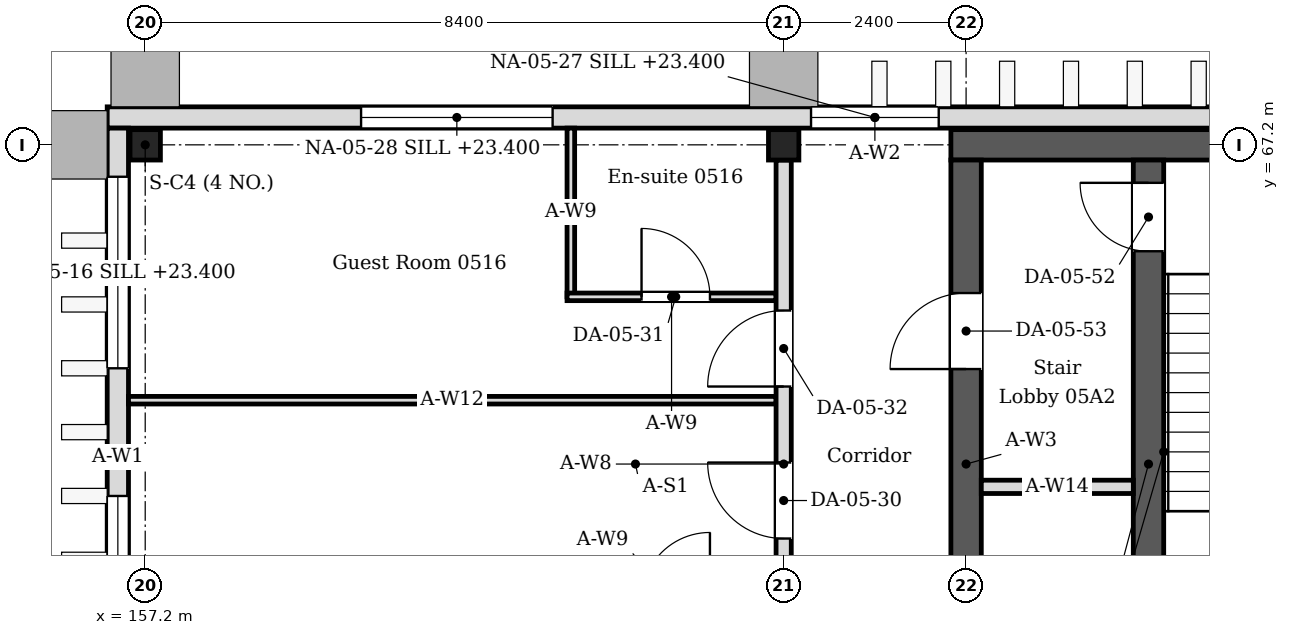
"""IFC4 building model, lengths in metres.
Left out: names, types, materials, properties, quantities, classifications, styles, units other than length and angle.
Written with IfcOpenShell. Run it as: python <this file> out.ifc"""

import sys

from ifc_helpers import new_model, si_unit, direction, frame, frame_2d, origin, origin_2d, place, context, subcontext, project, spatial, rectangle, i_section, extrude, element, fill, save


model = new_model("IFC4")
c1 = context("Model", 3, precision=1e-05, world=origin(), true_north=direction((0.0, 1.0)))
c2 = subcontext(c1, "Body", "Model", "MODEL_VIEW")
j1 = project(units=[si_unit("LENGTHUNIT", "METRE"), si_unit("PLANEANGLEUNIT", "RADIAN")], contexts=[c1])
p1 = place(None, origin())
s1 = spatial("IfcSite", under=j1, at=p1, CompositionType="ELEMENT")
p2 = place(p1, origin())
s2 = spatial("IfcBuilding", under=s1, at=p2, CompositionType="ELEMENT")
p3 = place(p2, frame((0.0, 0.0, 22.8)))
s3 = spatial("IfcBuildingStorey", under=s2, at=p3, CompositionType="ELEMENT", Elevation=22.8)
for number, where, z_axis, x_axis in (
    (1, (157.2, 67.2, 0.0), (0.0, 0.0, 1.0), (1.0, 0.0, 0.0)),
    (2, (165.6, 67.2, 0.0), (0.0, 0.0, 1.0), (1.0, 0.0, 0.0)),
):
    element("IfcColumn", number, at=place(p3, frame(where, z_axis=z_axis, x_axis=x_axis)), inside=s3, PredefinedType="COLUMN", context=c2, shape_type="SweptSolid", body=[
        extrude(i_section(OverallWidth=0.4, OverallDepth=0.4, WebThickness=0.013, FlangeThickness=0.021, FilletRadius=0.022, at=origin_2d()), origin(), (0.0, 0.0, 1.0), 4.2),
    ])
p4 = place(p3, frame((167.8, 67.2, 0.0), z_axis=(0.0, 0.0, 1.0), x_axis=(1.0, 0.0, 0.0)))
e3 = element("IfcWall", 3, at=p4, inside=s3, PredefinedType="SOLIDWALL", context=c2, shape_type="SweptSolid", body=[
    extrude(rectangle(XDim=8.8, YDim=0.4, at=frame_2d((4.4, 0.0))), origin(), (0.0, 0.0, 1.0), 4.05),
])
p5 = place(p3, frame((168.0, 59.0, 0.0), z_axis=(0.0, 0.0, 1.0), x_axis=(0.0, 1.0, 0.0)))
e4 = element("IfcWall", 4, at=p5, inside=s3, PredefinedType="SOLIDWALL", context=c2, shape_type="SweptSolid", body=[
    extrude(rectangle(XDim=8.0, YDim=0.4, at=frame_2d((4.0, 0.0))), origin(), (0.0, 0.0, 1.0), 4.05),
])
p6 = place(p5, frame((5.25, 0.0, 0.0)))
e5 = element("IfcOpeningElement", 5, at=p6, cuts=e4, PredefinedType="OPENING", context=c2, shape_type="SweptSolid", body=[
    extrude(rectangle(XDim=1.0, YDim=2.1, at=frame_2d((0.5, 1.05))), frame((0.0, 0.21, 0.0), z_axis=(0.0, -1.0, 0.0), x_axis=(1.0, 0.0, 0.0)), (0.0, 0.0, 1.0), 0.42),
])
p7 = place(p5, frame((1.275, 0.0, 0.0)))
e6 = element("IfcOpeningElement", 6, at=p7, cuts=e4, PredefinedType="OPENING", context=c2, shape_type="SweptSolid", body=[
    extrude(rectangle(XDim=1.05, YDim=2.1, at=frame_2d((0.525, 1.05))), frame((0.0, 0.21, 0.0), z_axis=(0.0, -1.0, 0.0), x_axis=(1.0, 0.0, 0.0)), (0.0, 0.0, 1.0), 0.42),
])
p8 = place(p3, frame((156.84, 58.45, 0.0), z_axis=(0.0, 0.0, 1.0), x_axis=(0.0, 1.0, 0.0)))
e7 = element("IfcWall", 7, at=p8, inside=s3, PredefinedType="SOLIDWALL", context=c2, shape_type="SweptSolid", body=[
    extrude(rectangle(XDim=8.97, YDim=0.28, at=frame_2d((4.485, 0.0))), origin(), (0.0, 0.0, 1.0), 4.05),
])
p9 = place(p8, frame((1.61, 0.0, 0.6)))
e8 = element("IfcOpeningElement", 8, at=p9, cuts=e7, PredefinedType="OPENING", context=c2, shape_type="SweptSolid", body=[
    extrude(rectangle(XDim=2.52, YDim=2.4, at=frame_2d((1.26, 1.2))), frame((0.0, 0.15, 0.0), z_axis=(0.0, -1.0, 0.0), x_axis=(1.0, 0.0, 0.0)), (0.0, 0.0, 1.0), 0.3),
])
p10 = place(p8, frame((5.81, 0.0, 0.6)))
e9 = element("IfcOpeningElement", 9, at=p10, cuts=e7, PredefinedType="OPENING", context=c2, shape_type="SweptSolid", body=[
    extrude(rectangle(XDim=2.52, YDim=2.4, at=frame_2d((1.26, 1.2))), frame((0.0, 0.15, 0.0), z_axis=(0.0, -1.0, 0.0), x_axis=(1.0, 0.0, 0.0)), (0.0, 0.0, 1.0), 0.3),
])
p11 = place(p3, frame((156.7, 67.56, 0.0), z_axis=(0.0, 0.0, 1.0), x_axis=(1.0, 0.0, 0.0)))
e10 = element("IfcWall", 10, at=p11, inside=s3, PredefinedType="SOLIDWALL", context=c2, shape_type="SweptSolid", body=[
    extrude(rectangle(XDim=20.2, YDim=0.28, at=frame_2d((10.1, 0.0))), origin(), (0.0, 0.0, 1.0), 4.05),
])
p12 = place(p11, frame((9.26, 0.0, 0.6)))
e11 = element("IfcOpeningElement", 11, at=p12, cuts=e10, PredefinedType="OPENING", context=c2, shape_type="SweptSolid", body=[
    extrude(rectangle(XDim=1.68, YDim=2.4, at=frame_2d((0.84, 1.2))), frame((0.0, 0.15, 0.0), z_axis=(0.0, -1.0, 0.0), x_axis=(1.0, 0.0, 0.0)), (0.0, 0.0, 1.0), 0.3),
])
p13 = place(p11, frame((3.34, 0.0, 0.6)))
e12 = element("IfcOpeningElement", 12, at=p13, cuts=e10, PredefinedType="OPENING", context=c2, shape_type="SweptSolid", body=[
    extrude(rectangle(XDim=2.52, YDim=2.4, at=frame_2d((1.26, 1.2))), frame((0.0, 0.15, 0.0), z_axis=(0.0, -1.0, 0.0), x_axis=(1.0, 0.0, 0.0)), (0.0, 0.0, 1.0), 0.3),
])
p14 = place(p3, frame((162.8, 65.2, 0.0), z_axis=(0.0, 0.0, 1.0), x_axis=(0.0, 1.0, 0.0)))
e13 = element("IfcWall", 13, at=p14, inside=s3, PredefinedType="PARTITIONING", context=c2, shape_type="SweptSolid", body=[
    extrude(rectangle(XDim=2.22, YDim=0.1, at=frame_2d((1.11, 0.0))), origin(), (0.0, 0.0, 1.0), 4.05),
])
p15 = place(p3, frame((162.75, 65.2, 0.0), z_axis=(0.0, 0.0, 1.0), x_axis=(1.0, 0.0, 0.0)))
e14 = element("IfcWall", 14, at=p15, inside=s3, PredefinedType="PARTITIONING", context=c2, shape_type="SweptSolid", body=[
    extrude(rectangle(XDim=2.75, YDim=0.1, at=frame_2d((1.375, 0.0))), origin(), (0.0, 0.0, 1.0), 4.05),
])
p16 = place(p15, frame((0.98, 0.0, 0.0)))
e15 = element("IfcOpeningElement", 15, at=p16, cuts=e14, PredefinedType="OPENING", context=c2, shape_type="SweptSolid", body=[
    extrude(rectangle(XDim=0.9, YDim=2.1, at=frame_2d((0.45, 1.05))), frame((0.0, 0.06, 0.0), z_axis=(0.0, -1.0, 0.0), x_axis=(1.0, 0.0, 0.0)), (0.0, 0.0, 1.0), 0.12),
])
p17 = place(p3, frame((156.98, 63.84, 0.0), z_axis=(0.0, 0.0, 1.0), x_axis=(1.0, 0.0, 0.0)))
e16 = element("IfcWall", 16, at=p17, inside=s3, PredefinedType="PARTITIONING", context=c2, shape_type="SweptSolid", body=[
    extrude(rectangle(XDim=8.52, YDim=0.1, at=frame_2d((4.26, 0.0))), origin(), (0.0, 0.0, 1.0), 3.604),
])
p18 = place(p3, frame((165.6, 59.0, 0.0), z_axis=(0.0, 0.0, 1.0), x_axis=(0.0, 1.0, 0.0)))
e17 = element("IfcWall", 17, at=p18, inside=s3, PredefinedType="PARTITIONING", context=c2, shape_type="SweptSolid", body=[
    extrude(rectangle(XDim=8.0, YDim=0.2, at=frame_2d((4.0, 0.0))), origin(), (0.0, 0.0, 1.0), 3.45),
])
p19 = place(p18, frame((3.02, 0.0, 0.0)))
e18 = element("IfcOpeningElement", 18, at=p19, cuts=e17, PredefinedType="OPENING", context=c2, shape_type="SweptSolid", body=[
    extrude(rectangle(XDim=1.0, YDim=2.4, at=frame_2d((0.5, 1.2))), frame((0.0, 0.11, 0.0), z_axis=(0.0, -1.0, 0.0), x_axis=(1.0, 0.0, 0.0)), (0.0, 0.0, 1.0), 0.22),
])
p20 = place(p18, frame((5.02, 0.0, 0.0)))
e19 = element("IfcOpeningElement", 19, at=p20, cuts=e17, PredefinedType="OPENING", context=c2, shape_type="SweptSolid", body=[
    extrude(rectangle(XDim=1.0, YDim=2.4, at=frame_2d((0.5, 1.2))), frame((0.0, 0.11, 0.0), z_axis=(0.0, -1.0, 0.0), x_axis=(1.0, 0.0, 0.0)), (0.0, 0.0, 1.0), 0.22),
])
p21 = place(p3, frame((170.4, 59.0, 0.0), z_axis=(0.0, 0.0, 1.0), x_axis=(0.0, 1.0, 0.0)))
e20 = element("IfcWall", 20, at=p21, inside=s3, PredefinedType="SOLIDWALL", context=c2, shape_type="SweptSolid", body=[
    extrude(rectangle(XDim=8.0, YDim=0.4, at=frame_2d((4.0, 0.0))), origin(), (0.0, 0.0, 1.0), 4.05),
])
p22 = place(p21, frame((6.8, 0.0, 0.0)))
e21 = element("IfcOpeningElement", 21, at=p22, cuts=e20, PredefinedType="OPENING", context=c2, shape_type="SweptSolid", body=[
    extrude(rectangle(XDim=0.9, YDim=2.1, at=frame_2d((0.45, 1.05))), frame((0.0, 0.21, 0.0), z_axis=(0.0, -1.0, 0.0), x_axis=(1.0, 0.0, 0.0)), (0.0, 0.0, 1.0), 0.42),
])
p23 = place(p3, frame((168.2, 62.7, 0.0), z_axis=(0.0, 0.0, 1.0), x_axis=(1.0, 0.0, 0.0)))
e22 = element("IfcWall", 22, at=p23, inside=s3, PredefinedType="PARTITIONING", context=c2, shape_type="SweptSolid", body=[
    extrude(rectangle(XDim=2.0, YDim=0.175, at=frame_2d((1.0, 0.0))), origin(), (0.0, 0.0, 1.0), 4.05),
])
p24 = place(p9, origin())
e23 = element("IfcWindow", 23, at=p24, inside=s3, PartitioningType="SINGLE_PANEL", PredefinedType="WINDOW", context=c2, shape_type="SweptSolid", body=[
    extrude(rectangle(XDim=2.52, YDim=2.4, at=frame_2d((1.26, 1.2))), frame((0.0, 0.03, 0.0), z_axis=(0.0, -1.0, 0.0), x_axis=(1.0, 0.0, 0.0)), (0.0, 0.0, 1.0), 0.06),
])
fill(e8, e23)
p25 = place(p10, origin())
e24 = element("IfcWindow", 24, at=p25, inside=s3, PartitioningType="SINGLE_PANEL", PredefinedType="WINDOW", context=c2, shape_type="SweptSolid", body=[
    extrude(rectangle(XDim=2.52, YDim=2.4, at=frame_2d((1.26, 1.2))), frame((0.0, 0.03, 0.0), z_axis=(0.0, -1.0, 0.0), x_axis=(1.0, 0.0, 0.0)), (0.0, 0.0, 1.0), 0.06),
])
fill(e9, e24)
p26 = place(p12, origin())
e25 = element("IfcWindow", 25, at=p26, inside=s3, PartitioningType="SINGLE_PANEL", PredefinedType="WINDOW", context=c2, shape_type="SweptSolid", body=[
    extrude(rectangle(XDim=1.68, YDim=2.4, at=frame_2d((0.84, 1.2))), frame((0.0, 0.03, 0.0), z_axis=(0.0, -1.0, 0.0), x_axis=(1.0, 0.0, 0.0)), (0.0, 0.0, 1.0), 0.06),
])
fill(e11, e25)
p27 = place(p13, origin())
e26 = element("IfcWindow", 26, at=p27, inside=s3, PartitioningType="SINGLE_PANEL", PredefinedType="WINDOW", context=c2, shape_type="SweptSolid", body=[
    extrude(rectangle(XDim=2.52, YDim=2.4, at=frame_2d((1.26, 1.2))), frame((0.0, 0.03, 0.0), z_axis=(0.0, -1.0, 0.0), x_axis=(1.0, 0.0, 0.0)), (0.0, 0.0, 1.0), 0.06),
])
fill(e12, e26)
p28 = place(p19, origin())
e27 = element("IfcDoor", 27, at=p28, inside=s3, OperationType="SINGLE_SWING_RIGHT", PredefinedType="DOOR", context=c2, shape_type="SweptSolid", body=[
    extrude(rectangle(XDim=1.0, YDim=2.4, at=frame_2d((0.5, 1.2))), frame((0.0, 0.025, 0.0), z_axis=(0.0, -1.0, 0.0), x_axis=(1.0, 0.0, 0.0)), (0.0, 0.0, 1.0), 0.05),
])
fill(e18, e27)
p29 = place(p16, origin())
e28 = element("IfcDoor", 28, at=p29, inside=s3, OperationType="SINGLE_SWING_LEFT", PredefinedType="DOOR", context=c2, shape_type="SweptSolid", body=[
    extrude(rectangle(XDim=0.9, YDim=2.1, at=frame_2d((0.45, 1.05))), frame((0.0, 0.025, 0.0), z_axis=(0.0, -1.0, 0.0), x_axis=(1.0, 0.0, 0.0)), (0.0, 0.0, 1.0), 0.05),
])
fill(e15, e28)
p30 = place(p20, origin())
e29 = element("IfcDoor", 29, at=p30, inside=s3, OperationType="SINGLE_SWING_LEFT", PredefinedType="DOOR", context=c2, shape_type="SweptSolid", body=[
    extrude(rectangle(XDim=1.0, YDim=2.4, at=frame_2d((0.5, 1.2))), frame((0.0, 0.025, 0.0), z_axis=(0.0, -1.0, 0.0), x_axis=(1.0, 0.0, 0.0)), (0.0, 0.0, 1.0), 0.05),
])
fill(e19, e29)
p31 = place(p22, origin())
e30 = element("IfcDoor", 30, at=p31, inside=s3, OperationType="SINGLE_SWING_RIGHT", PredefinedType="DOOR", context=c2, shape_type="SweptSolid", body=[
    extrude(rectangle(XDim=0.9, YDim=2.1, at=frame_2d((0.45, 1.05))), frame((0.0, 0.025, 0.0), z_axis=(0.0, -1.0, 0.0), x_axis=(1.0, 0.0, 0.0)), (0.0, 0.0, 1.0), 0.05),
])
fill(e21, e30)
p32 = place(p6, origin())
e31 = element("IfcDoor", 31, at=p32, inside=s3, OperationType="SINGLE_SWING_LEFT", PredefinedType="DOOR", context=c2, shape_type="SweptSolid", body=[
    extrude(rectangle(XDim=1.0, YDim=2.1, at=frame_2d((0.5, 1.05))), frame((0.0, 0.025, 0.0), z_axis=(0.0, -1.0, 0.0), x_axis=(1.0, 0.0, 0.0)), (0.0, 0.0, 1.0), 0.05),
])
fill(e5, e31)
save(model, sys.argv[1])
